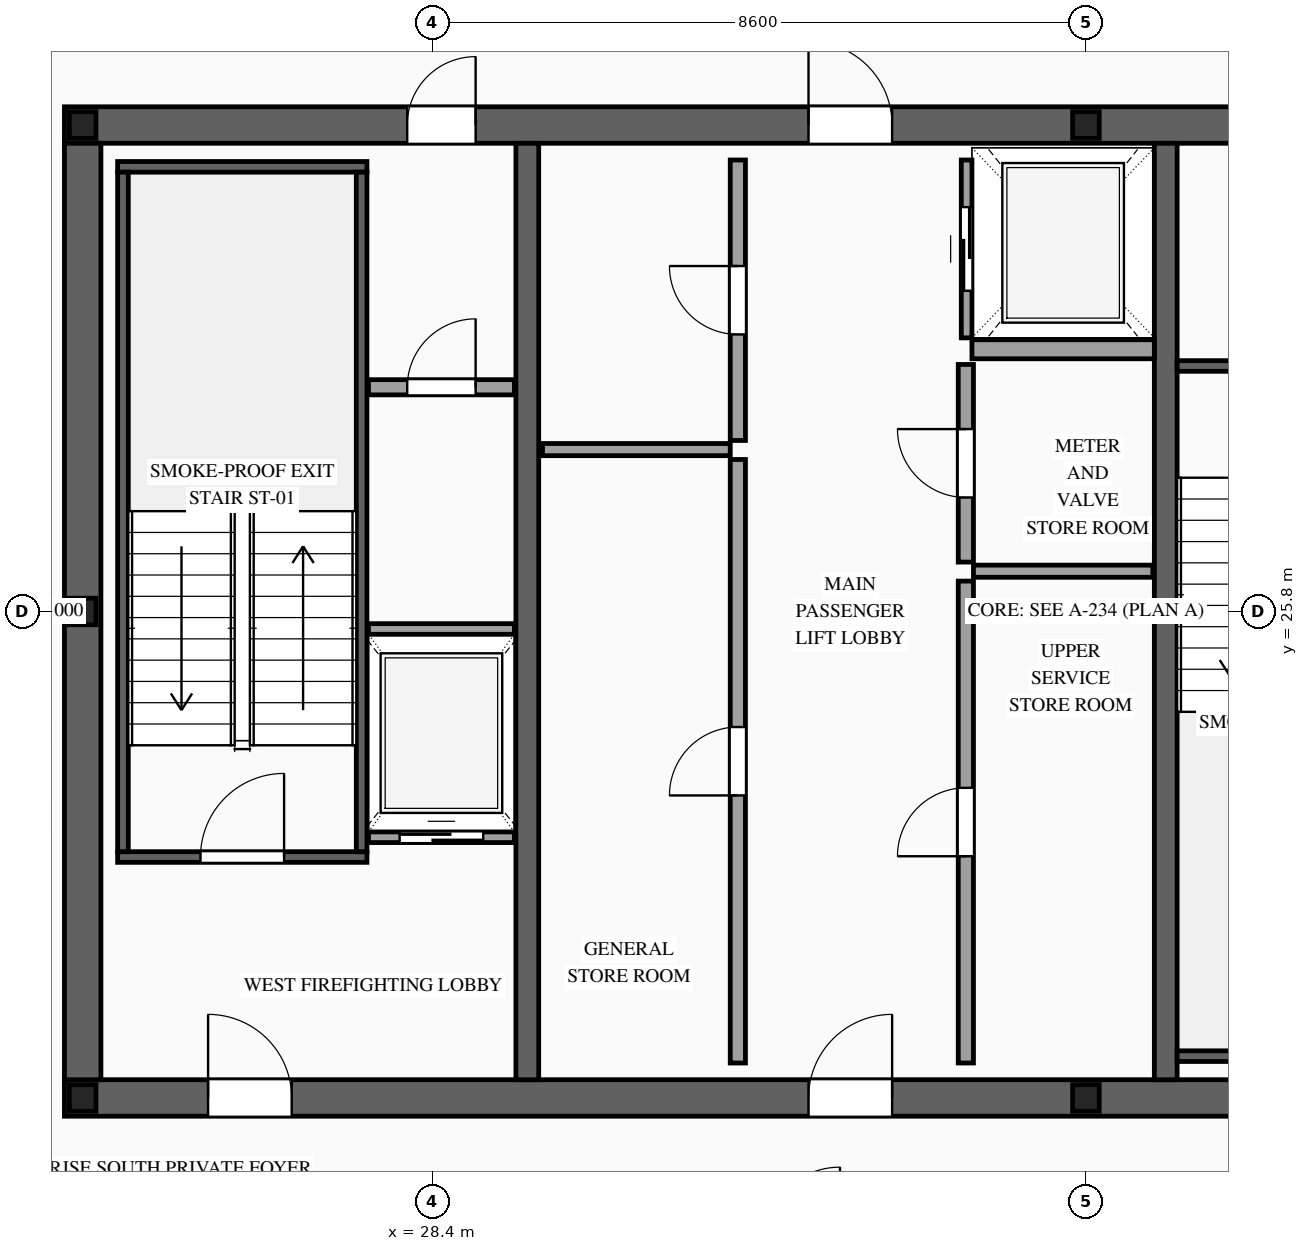
"""IFC4 building model, lengths in metres.
Left out: names, types, materials, properties, quantities, classifications, styles, units other than length and angle.
Written with IfcOpenShell. Run it as: python <this file> out.ifc"""

import sys

from ifc_helpers import new_model, si_unit, direction, frame, frame_2d, origin, origin_2d, place, context, subcontext, project, spatial, rectangle, i_section, extrude, source, transform, mapped, element, fill, save


model = new_model("IFC4")
c1 = context("Model", 3, precision=1e-05, world=origin(), true_north=direction((0.0, 1.0)))
c2 = subcontext(c1, "Body", "Model", "MODEL_VIEW")
j1 = project(units=[si_unit("LENGTHUNIT", "METRE"), si_unit("PLANEANGLEUNIT", "RADIAN")], contexts=[c1])
p1 = place(None, origin())
s1 = spatial("IfcSite", under=j1, at=p1, CompositionType="ELEMENT")
p2 = place(p1, origin())
s2 = spatial("IfcBuilding", under=s1, at=p2, CompositionType="ELEMENT")
p3 = place(p2, frame((0.0, 0.0, 343.2)))
s3 = spatial("IfcBuildingStorey", under=s2, at=p3, CompositionType="ELEMENT", Elevation=343.2)
p4 = place(p3, frame((23.56, 19.4, 0.0), z_axis=(0.0, 0.0, 1.0), x_axis=(1.0, 0.0, 0.0)))
e1 = element("IfcWall", 1, at=p4, inside=s3, PredefinedType="SHEAR", context=c2, shape_type="SweptSolid", body=[
    extrude(rectangle(XDim=26.88, YDim=0.48, at=frame_2d((13.44, 0.0))), origin(), (0.0, 0.0, 1.0), 4.0),
])
p5 = place(p4, frame((1.89, 0.0, 0.0)))
e2 = element("IfcOpeningElement", 2, at=p5, cuts=e1, PredefinedType="OPENING", context=c2, shape_type="SweptSolid", body=[
    extrude(rectangle(XDim=1.1, YDim=2.2, at=frame_2d((0.55, 1.1))), frame((0.0, 0.255, 0.0), z_axis=(0.0, -1.0, 0.0), x_axis=(1.0, 0.0, 0.0)), (0.0, 0.0, 1.0), 0.51),
])
p6 = place(p4, frame((9.79, 0.0, 0.0)))
e3 = element("IfcOpeningElement", 3, at=p6, cuts=e1, PredefinedType="OPENING", context=c2, shape_type="SweptSolid", body=[
    extrude(rectangle(XDim=1.1, YDim=2.2, at=frame_2d((0.55, 1.1))), frame((0.0, 0.255, 0.0), z_axis=(0.0, -1.0, 0.0), x_axis=(1.0, 0.0, 0.0)), (0.0, 0.0, 1.0), 0.51),
])
p7 = place(p4, frame((22.99, 0.0, 0.0)))
e4 = element("IfcOpeningElement", 4, at=p7, cuts=e1, PredefinedType="OPENING", context=c2, shape_type="SweptSolid", body=[
    extrude(rectangle(XDim=1.1, YDim=2.2, at=frame_2d((0.55, 1.1))), frame((0.0, 0.255, 0.0), z_axis=(0.0, -1.0, 0.0), x_axis=(1.0, 0.0, 0.0)), (0.0, 0.0, 1.0), 0.51),
])
p8 = place(p4, frame((19.61, 0.0, 0.0)))
e5 = element("IfcOpeningElement", 5, at=p8, cuts=e1, PredefinedType="OPENING", context=c2, shape_type="SweptSolid", body=[
    extrude(rectangle(XDim=0.9, YDim=2.15, at=frame_2d((0.45, 1.075))), frame((0.0, 0.255, 0.0), z_axis=(0.0, -1.0, 0.0), x_axis=(1.0, 0.0, 0.0)), (0.0, 0.0, 1.0), 0.51),
])
p9 = place(p4, frame((18.17, 0.0, 0.0)))
e6 = element("IfcOpeningElement", 6, at=p9, cuts=e1, PredefinedType="OPENING", context=c2, shape_type="SweptSolid", body=[
    extrude(rectangle(XDim=0.9, YDim=2.15, at=frame_2d((0.45, 1.075))), frame((0.0, 0.255, 0.0), z_axis=(0.0, -1.0, 0.0), x_axis=(1.0, 0.0, 0.0)), (0.0, 0.0, 1.0), 0.51),
])
p10 = place(p3, frame((23.56, 32.2, 0.0), z_axis=(0.0, 0.0, 1.0), x_axis=(1.0, 0.0, 0.0)))
e7 = element("IfcWall", 7, at=p10, inside=s3, PredefinedType="SHEAR", context=c2, shape_type="SweptSolid", body=[
    extrude(rectangle(XDim=26.88, YDim=0.48, at=frame_2d((13.44, 0.0))), origin(), (0.0, 0.0, 1.0), 4.0),
])
p11 = place(p10, frame((4.51, 0.0, 0.0)))
e8 = element("IfcOpeningElement", 8, at=p11, cuts=e7, PredefinedType="OPENING", context=c2, shape_type="SweptSolid", body=[
    extrude(rectangle(XDim=0.9, YDim=2.15, at=frame_2d((0.45, 1.075))), frame((0.0, 0.255, 0.0), z_axis=(0.0, -1.0, 0.0), x_axis=(1.0, 0.0, 0.0)), (0.0, 0.0, 1.0), 0.51),
])
p12 = place(p10, frame((9.79, 0.0, 0.0)))
e9 = element("IfcOpeningElement", 9, at=p12, cuts=e7, PredefinedType="OPENING", context=c2, shape_type="SweptSolid", body=[
    extrude(rectangle(XDim=1.1, YDim=2.2, at=frame_2d((0.55, 1.1))), frame((0.0, 0.255, 0.0), z_axis=(0.0, -1.0, 0.0), x_axis=(1.0, 0.0, 0.0)), (0.0, 0.0, 1.0), 0.51),
])
p13 = place(p10, frame((15.64, 0.0, 0.0)))
e10 = element("IfcOpeningElement", 10, at=p13, cuts=e7, PredefinedType="OPENING", context=c2, shape_type="SweptSolid", body=[
    extrude(rectangle(XDim=1.1, YDim=2.2, at=frame_2d((0.55, 1.1))), frame((0.0, 0.255, 0.0), z_axis=(0.0, -1.0, 0.0), x_axis=(1.0, 0.0, 0.0)), (0.0, 0.0, 1.0), 0.51),
])
p14 = place(p10, frame((18.74, 0.0, 0.0)))
e11 = element("IfcOpeningElement", 11, at=p14, cuts=e7, PredefinedType="OPENING", context=c2, shape_type="SweptSolid", body=[
    extrude(rectangle(XDim=1.1, YDim=2.2, at=frame_2d((0.55, 1.1))), frame((0.0, 0.255, 0.0), z_axis=(0.0, -1.0, 0.0), x_axis=(1.0, 0.0, 0.0)), (0.0, 0.0, 1.0), 0.51),
])
m1 = source(origin(), c2, "Body", "SweptSolid", [
    extrude(rectangle(XDim=12.32, YDim=0.48, at=frame_2d((6.16, 0.0))), origin(), (0.0, 0.0, 1.0), 4.0),
])
p15 = place(p3, frame((23.8, 19.64, 0.0), z_axis=(0.0, 0.0, 1.0), x_axis=(0.0, 1.0, 0.0)))
e12 = element("IfcWall", 12, at=p15, inside=s3, PredefinedType="SHEAR", context=c2, shape_type="MappedRepresentation", body=[
    mapped(m1, transform((0.0, 0.0, 0.0), scale=1.0)),
])
m2 = source(origin(), c2, "Body", "SweptSolid", [
    extrude(rectangle(XDim=12.32, YDim=0.3, at=frame_2d((6.16, 0.0))), origin(), (0.0, 0.0, 1.0), 4.0),
])
for number, where, z_axis, x_axis in (
    (13, (29.65, 19.64, 0.0), (0.0, 0.0, 1.0), (0.0, 1.0, 0.0)),
    (14, (38.05, 19.64, 0.0), (0.0, 0.0, 1.0), (0.0, 1.0, 0.0)),
):
    element("IfcWall", number, at=place(p3, frame(where, z_axis=z_axis, x_axis=x_axis)), inside=s3, PredefinedType="SOLIDWALL", context=c2, shape_type="MappedRepresentation", body=[
        mapped(m2, transform((0.0, 0.0, 0.0), scale=1.0)),
    ])
m3 = source(origin(), c2, "Body", "SweptSolid", [
    extrude(i_section(OverallWidth=0.35, OverallDepth=0.35, WebThickness=0.012, FlangeThickness=0.019, at=origin_2d()), origin(), (0.0, 0.0, 1.0), 4.0),
])
for number, where, z_axis, x_axis in (
    (15, (23.8, 19.4, 0.0), (0.0, 0.0, 1.0), (1.0, 0.0, 0.0)),
    (16, (37.0, 19.4, 0.0), (0.0, 0.0, 1.0), (1.0, 0.0, 0.0)),
    (17, (23.8, 25.8, 0.0), (0.0, 0.0, 1.0), (1.0, 0.0, 0.0)),
    (18, (23.8, 32.2, 0.0), (0.0, 0.0, 1.0), (1.0, 0.0, 0.0)),
    (19, (37.0, 32.2, 0.0), (0.0, 0.0, 1.0), (1.0, 0.0, 0.0)),
):
    element("IfcColumn", number, at=place(p3, frame(where, z_axis=z_axis, x_axis=x_axis)), inside=s3, PredefinedType="COLUMN", context=c2, shape_type="MappedRepresentation", body=[
        mapped(m3, transform((0.0, 0.0, 0.0), scale=1.0)),
    ])
p16 = place(p3, frame((27.56, 22.83, 0.0), z_axis=(0.0, 0.0, 1.0), x_axis=(1.0, 0.0, 0.0)))
e20 = element("IfcWall", 20, at=p16, inside=s3, PredefinedType="SOLIDWALL", context=c2, shape_type="SweptSolid", body=[
    extrude(rectangle(XDim=1.92, YDim=0.14, at=frame_2d((0.96, 0.0))), origin(), (0.0, 0.0, 1.0), 3.76),
])
p17 = place(p16, frame((0.41, 0.0, 0.0)))
e21 = element("IfcOpeningElement", 21, at=p17, cuts=e20, PredefinedType="OPENING", context=c2, shape_type="SweptSolid", body=[
    extrude(rectangle(XDim=1.1, YDim=2.2, at=frame_2d((0.55, 1.1))), frame((0.0, 0.085, 0.0), z_axis=(0.0, -1.0, 0.0), x_axis=(1.0, 0.0, 0.0)), (0.0, 0.0, 1.0), 0.17),
])
m4 = source(origin(), c2, "Body", "SweptSolid", [
    extrude(rectangle(XDim=1.92, YDim=0.14, at=frame_2d((0.96, 0.0))), origin(), (0.0, 0.0, 1.0), 3.76),
])
p18 = place(p3, frame((27.56, 25.57, 0.0), z_axis=(0.0, 0.0, 1.0), x_axis=(1.0, 0.0, 0.0)))
e22 = element("IfcWall", 22, at=p18, inside=s3, PredefinedType="SOLIDWALL", context=c2, shape_type="MappedRepresentation", body=[
    mapped(m4, transform((0.0, 0.0, 0.0), scale=1.0)),
])
p19 = place(p3, frame((35.43, 29.4, 0.0), z_axis=(0.0, 0.0, 1.0), x_axis=(0.0, 1.0, 0.0)))
e23 = element("IfcWall", 23, at=p19, inside=s3, PredefinedType="SOLIDWALL", context=c2, shape_type="SweptSolid", body=[
    extrude(rectangle(XDim=2.34, YDim=0.14, at=frame_2d((1.17, 0.0))), origin(), (0.0, 0.0, 1.0), 3.76),
])
p20 = place(p19, frame((0.62, 0.0, 0.0)))
e24 = element("IfcOpeningElement", 24, at=p20, cuts=e23, PredefinedType="OPENING", context=c2, shape_type="SweptSolid", body=[
    extrude(rectangle(XDim=1.1, YDim=2.2, at=frame_2d((0.55, 1.1))), frame((0.0, 0.085, 0.0), z_axis=(0.0, -1.0, 0.0), x_axis=(1.0, 0.0, 0.0)), (0.0, 0.0, 1.0), 0.17),
])
m5 = source(origin(), c2, "Body", "SweptSolid", [
    extrude(rectangle(XDim=2.4, YDim=0.25, at=frame_2d((1.2, 0.0))), origin(), (0.0, 0.0, 1.0), 3.76),
])
p21 = place(p3, frame((35.5, 29.25, 0.0), z_axis=(0.0, 0.0, 1.0), x_axis=(1.0, 0.0, 0.0)))
e25 = element("IfcWall", 25, at=p21, inside=s3, PredefinedType="SOLIDWALL", context=c2, shape_type="MappedRepresentation", body=[
    mapped(m5, transform((0.0, 0.0, 0.0), scale=1.0)),
])
p22 = place(p3, frame((24.26, 22.57, 0.0), z_axis=(0.0, 0.0, 1.0), x_axis=(1.0, 0.0, 0.0)))
e26 = element("IfcWall", 26, at=p22, inside=s3, PredefinedType="SOLIDWALL", context=c2, shape_type="SweptSolid", body=[
    extrude(rectangle(XDim=3.28, YDim=0.14, at=frame_2d((1.64, 0.0))), origin(), (0.0, 0.0, 1.0), 3.76),
])
p23 = place(p22, frame((1.09, 0.0, 0.0)))
e27 = element("IfcOpeningElement", 27, at=p23, cuts=e26, PredefinedType="OPENING", context=c2, shape_type="SweptSolid", body=[
    extrude(rectangle(XDim=1.1, YDim=2.2, at=frame_2d((0.55, 1.1))), frame((0.0, 0.085, 0.0), z_axis=(0.0, -1.0, 0.0), x_axis=(1.0, 0.0, 0.0)), (0.0, 0.0, 1.0), 0.17),
])
m6 = source(origin(), c2, "Body", "SweptSolid", [
    extrude(rectangle(XDim=3.28, YDim=0.14, at=frame_2d((1.64, 0.0))), origin(), (0.0, 0.0, 1.0), 3.76),
])
p24 = place(p3, frame((24.26, 31.65, 0.0), z_axis=(0.0, 0.0, 1.0), x_axis=(1.0, 0.0, 0.0)))
e28 = element("IfcWall", 28, at=p24, inside=s3, PredefinedType="SOLIDWALL", context=c2, shape_type="MappedRepresentation", body=[
    mapped(m6, transform((0.0, 0.0, 0.0), scale=1.0)),
])
m7 = source(origin(), c2, "Body", "SweptSolid", [
    extrude(rectangle(XDim=8.94, YDim=0.14, at=frame_2d((4.47, 0.0))), origin(), (0.0, 0.0, 1.0), 3.76),
])
for number, where, z_axis, x_axis in (
    (29, (24.33, 22.64, 0.0), (0.0, 0.0, 1.0), (0.0, 1.0, 0.0)),
    (30, (27.47, 22.64, 0.0), (0.0, 0.0, 1.0), (0.0, 1.0, 0.0)),
):
    element("IfcWall", number, at=place(p3, frame(where, z_axis=z_axis, x_axis=x_axis)), inside=s3, PredefinedType="SOLIDWALL", context=c2, shape_type="MappedRepresentation", body=[
        mapped(m7, transform((0.0, 0.0, 0.0), scale=1.0)),
    ])
p25 = place(p3, frame((38.2, 29.03, 0.0), z_axis=(0.0, 0.0, 1.0), x_axis=(1.0, 0.0, 0.0)))
e31 = element("IfcWall", 31, at=p25, inside=s3, PredefinedType="SOLIDWALL", context=c2, shape_type="SweptSolid", body=[
    extrude(rectangle(XDim=3.14, YDim=0.14, at=frame_2d((1.57, 0.0))), origin(), (0.0, 0.0, 1.0), 3.76),
])
p26 = place(p25, frame((1.02, 0.0, 0.0)))
e32 = element("IfcOpeningElement", 32, at=p26, cuts=e31, PredefinedType="OPENING", context=c2, shape_type="SweptSolid", body=[
    extrude(rectangle(XDim=1.1, YDim=2.2, at=frame_2d((0.55, 1.1))), frame((0.0, 0.085, 0.0), z_axis=(0.0, -1.0, 0.0), x_axis=(1.0, 0.0, 0.0)), (0.0, 0.0, 1.0), 0.17),
])
m8 = source(origin(), c2, "Body", "SweptSolid", [
    extrude(rectangle(XDim=3.14, YDim=0.14, at=frame_2d((1.57, 0.0))), origin(), (0.0, 0.0, 1.0), 3.76),
])
p27 = place(p3, frame((38.2, 19.95, 0.0), z_axis=(0.0, 0.0, 1.0), x_axis=(1.0, 0.0, 0.0)))
e33 = element("IfcWall", 33, at=p27, inside=s3, PredefinedType="SOLIDWALL", context=c2, shape_type="MappedRepresentation", body=[
    mapped(m8, transform((0.0, 0.0, 0.0), scale=1.0)),
])
p28 = place(p3, frame((27.56, 28.75, 0.0), z_axis=(0.0, 0.0, 1.0), x_axis=(1.0, 0.0, 0.0)))
e34 = element("IfcWall", 34, at=p28, inside=s3, PredefinedType="PARTITIONING", context=c2, shape_type="SweptSolid", body=[
    extrude(rectangle(XDim=1.92, YDim=0.2, at=frame_2d((0.96, 0.0))), origin(), (0.0, 0.0, 1.0), 3.76),
])
p29 = place(p28, frame((0.51, 0.0, 0.0)))
e35 = element("IfcOpeningElement", 35, at=p29, cuts=e34, PredefinedType="OPENING", context=c2, shape_type="SweptSolid", body=[
    extrude(rectangle(XDim=0.9, YDim=2.15, at=frame_2d((0.45, 1.075))), frame((0.0, 0.115, 0.0), z_axis=(0.0, -1.0, 0.0), x_axis=(1.0, 0.0, 0.0)), (0.0, 0.0, 1.0), 0.23),
])
p30 = place(p3, frame((32.42, 19.86, 0.0), z_axis=(0.0, 0.0, 1.0), x_axis=(0.0, 1.0, 0.0)))
e36 = element("IfcWall", 36, at=p30, inside=s3, PredefinedType="PARTITIONING", context=c2, shape_type="SweptSolid", body=[
    extrude(rectangle(XDim=7.94, YDim=0.2, at=frame_2d((3.97, 0.0))), origin(), (0.0, 0.0, 1.0), 3.76),
])
p31 = place(p30, frame((3.52, 0.0, 0.0)))
e37 = element("IfcOpeningElement", 37, at=p31, cuts=e36, PredefinedType="OPENING", context=c2, shape_type="SweptSolid", body=[
    extrude(rectangle(XDim=0.9, YDim=2.15, at=frame_2d((0.45, 1.075))), frame((0.0, 0.115, 0.0), z_axis=(0.0, -1.0, 0.0), x_axis=(1.0, 0.0, 0.0)), (0.0, 0.0, 1.0), 0.23),
])
p32 = place(p3, frame((32.42, 28.05, 0.0), z_axis=(0.0, 0.0, 1.0), x_axis=(0.0, 1.0, 0.0)))
e38 = element("IfcWall", 38, at=p32, inside=s3, PredefinedType="PARTITIONING", context=c2, shape_type="SweptSolid", body=[
    extrude(rectangle(XDim=3.69, YDim=0.2, at=frame_2d((1.845, 0.0))), origin(), (0.0, 0.0, 1.0), 3.76),
])
p33 = place(p32, frame((1.395, 0.0, 0.0)))
e39 = element("IfcOpeningElement", 39, at=p33, cuts=e38, PredefinedType="OPENING", context=c2, shape_type="SweptSolid", body=[
    extrude(rectangle(XDim=0.9, YDim=2.15, at=frame_2d((0.45, 1.075))), frame((0.0, 0.115, 0.0), z_axis=(0.0, -1.0, 0.0), x_axis=(1.0, 0.0, 0.0)), (0.0, 0.0, 1.0), 0.23),
])
m9 = source(origin(), c2, "Body", "SweptSolid", [
    extrude(rectangle(XDim=2.47, YDim=0.16, at=frame_2d((1.235, 0.0))), origin(), (0.0, 0.0, 1.0), 3.76),
])
p34 = place(p3, frame((29.85, 27.93, 0.0), z_axis=(0.0, 0.0, 1.0), x_axis=(1.0, 0.0, 0.0)))
e40 = element("IfcWall", 40, at=p34, inside=s3, PredefinedType="PARTITIONING", context=c2, shape_type="MappedRepresentation", body=[
    mapped(m9, transform((0.0, 0.0, 0.0), scale=1.0)),
])
p35 = place(p3, frame((35.42, 19.86, 0.0), z_axis=(0.0, 0.0, 1.0), x_axis=(0.0, 1.0, 0.0)))
e41 = element("IfcWall", 41, at=p35, inside=s3, PredefinedType="PARTITIONING", context=c2, shape_type="SweptSolid", body=[
    extrude(rectangle(XDim=6.34, YDim=0.2, at=frame_2d((3.17, 0.0))), origin(), (0.0, 0.0, 1.0), 3.76),
])
p36 = place(p35, frame((2.72, 0.0, 0.0)))
e42 = element("IfcOpeningElement", 42, at=p36, cuts=e41, PredefinedType="OPENING", context=c2, shape_type="SweptSolid", body=[
    extrude(rectangle(XDim=0.9, YDim=2.15, at=frame_2d((0.45, 1.075))), frame((0.0, 0.115, 0.0), z_axis=(0.0, -1.0, 0.0), x_axis=(1.0, 0.0, 0.0)), (0.0, 0.0, 1.0), 0.23),
])
p37 = place(p3, frame((35.42, 26.45, 0.0), z_axis=(0.0, 0.0, 1.0), x_axis=(0.0, 1.0, 0.0)))
e43 = element("IfcWall", 43, at=p37, inside=s3, PredefinedType="PARTITIONING", context=c2, shape_type="SweptSolid", body=[
    extrude(rectangle(XDim=2.6, YDim=0.2, at=frame_2d((1.3, 0.0))), origin(), (0.0, 0.0, 1.0), 3.76),
])
p38 = place(p37, frame((0.85, 0.0, 0.0)))
e44 = element("IfcOpeningElement", 44, at=p38, cuts=e43, PredefinedType="OPENING", context=c2, shape_type="SweptSolid", body=[
    extrude(rectangle(XDim=0.9, YDim=2.15, at=frame_2d((0.45, 1.075))), frame((0.0, 0.115, 0.0), z_axis=(0.0, -1.0, 0.0), x_axis=(1.0, 0.0, 0.0)), (0.0, 0.0, 1.0), 0.23),
])
m10 = source(origin(), c2, "Body", "SweptSolid", [
    extrude(rectangle(XDim=2.36, YDim=0.16, at=frame_2d((1.18, 0.0))), origin(), (0.0, 0.0, 1.0), 3.76),
])
p39 = place(p3, frame((35.52, 26.33, 0.0), z_axis=(0.0, 0.0, 1.0), x_axis=(1.0, 0.0, 0.0)))
e45 = element("IfcWall", 45, at=p39, inside=s3, PredefinedType="PARTITIONING", context=c2, shape_type="MappedRepresentation", body=[
    mapped(m10, transform((0.0, 0.0, 0.0), scale=1.0)),
])
m11 = source(origin(), c2, "Body", "SweptSolid", [
    extrude(rectangle(XDim=1.1, YDim=2.2, at=frame_2d((0.55, 1.1))), frame((0.0, 0.025, 0.0), z_axis=(0.0, -1.0, 0.0), x_axis=(1.0, 0.0, 0.0)), (0.0, 0.0, 1.0), 0.05),
])
p40 = place(p17, origin())
e46 = element("IfcDoor", 46, at=p40, inside=s3, OperationType="SLIDING_TO_LEFT", PredefinedType="DOOR", context=c2, shape_type="MappedRepresentation", body=[
    mapped(m11, transform((0.0, 0.0, 0.0), scale=1.0)),
])
fill(e21, e46)
p41 = place(p20, origin())
e47 = element("IfcDoor", 47, at=p41, inside=s3, OperationType="SLIDING_TO_RIGHT", PredefinedType="DOOR", context=c2, shape_type="MappedRepresentation", body=[
    mapped(m11, transform((0.0, 0.0, 0.0), scale=1.0)),
])
fill(e24, e47)
m12 = source(origin(), c2, "Body", "SweptSolid", [
    extrude(rectangle(XDim=1.1, YDim=2.2, at=frame_2d((0.55, 1.1))), frame((0.0, 0.025, 0.0), z_axis=(0.0, -1.0, 0.0), x_axis=(1.0, 0.0, 0.0)), (0.0, 0.0, 1.0), 0.05),
])
p42 = place(p23, origin())
e48 = element("IfcDoor", 48, at=p42, inside=s3, OperationType="SINGLE_SWING_RIGHT", PredefinedType="DOOR", context=c2, shape_type="MappedRepresentation", body=[
    mapped(m12, transform((0.0, 0.0, 0.0), scale=1.0)),
])
fill(e27, e48)
p43 = place(p5, origin())
e49 = element("IfcDoor", 49, at=p43, inside=s3, OperationType="SINGLE_SWING_LEFT", PredefinedType="DOOR", context=c2, shape_type="MappedRepresentation", body=[
    mapped(m12, transform((0.0, 0.0, 0.0), scale=1.0)),
])
fill(e2, e49)
p44 = place(p6, origin())
e50 = element("IfcDoor", 50, at=p44, inside=s3, OperationType="SINGLE_SWING_RIGHT", PredefinedType="DOOR", context=c2, shape_type="MappedRepresentation", body=[
    mapped(m12, transform((0.0, 0.0, 0.0), scale=1.0)),
])
fill(e3, e50)
m13 = source(origin(), c2, "Body", "SweptSolid", [
    extrude(rectangle(XDim=0.9, YDim=2.15, at=frame_2d((0.45, 1.075))), frame((0.0, 0.025, 0.0), z_axis=(0.0, -1.0, 0.0), x_axis=(1.0, 0.0, 0.0)), (0.0, 0.0, 1.0), 0.05),
])
p45 = place(p11, origin())
e51 = element("IfcDoor", 51, at=p45, inside=s3, OperationType="SINGLE_SWING_RIGHT", PredefinedType="DOOR", context=c2, shape_type="MappedRepresentation", body=[
    mapped(m13, transform((0.0, 0.0, 0.0), scale=1.0)),
])
fill(e8, e51)
p46 = place(p12, origin())
e52 = element("IfcDoor", 52, at=p46, inside=s3, OperationType="SINGLE_SWING_LEFT", PredefinedType="DOOR", context=c2, shape_type="MappedRepresentation", body=[
    mapped(m12, transform((0.0, 0.0, 0.0), scale=1.0)),
])
fill(e9, e52)
p47 = place(p29, origin())
e53 = element("IfcDoor", 53, at=p47, inside=s3, OperationType="SINGLE_SWING_RIGHT", PredefinedType="DOOR", context=c2, shape_type="MappedRepresentation", body=[
    mapped(m13, transform((0.0, 0.0, 0.0), scale=1.0)),
])
fill(e35, e53)
p48 = place(p31, origin())
e54 = element("IfcDoor", 54, at=p48, inside=s3, OperationType="SINGLE_SWING_LEFT", PredefinedType="DOOR", context=c2, shape_type="MappedRepresentation", body=[
    mapped(m13, transform((0.0, 0.0, 0.0), scale=1.0)),
])
fill(e37, e54)
p49 = place(p33, origin())
e55 = element("IfcDoor", 55, at=p49, inside=s3, OperationType="SINGLE_SWING_RIGHT", PredefinedType="DOOR", context=c2, shape_type="MappedRepresentation", body=[
    mapped(m13, transform((0.0, 0.0, 0.0), scale=1.0)),
])
fill(e39, e55)
p50 = place(p36, origin())
e56 = element("IfcDoor", 56, at=p50, inside=s3, OperationType="SINGLE_SWING_LEFT", PredefinedType="DOOR", context=c2, shape_type="MappedRepresentation", body=[
    mapped(m13, transform((0.0, 0.0, 0.0), scale=1.0)),
])
fill(e42, e56)
p51 = place(p38, origin())
e57 = element("IfcDoor", 57, at=p51, inside=s3, OperationType="SINGLE_SWING_RIGHT", PredefinedType="DOOR", context=c2, shape_type="MappedRepresentation", body=[
    mapped(m13, transform((0.0, 0.0, 0.0), scale=1.0)),
])
fill(e44, e57)
save(model, sys.argv[1])
